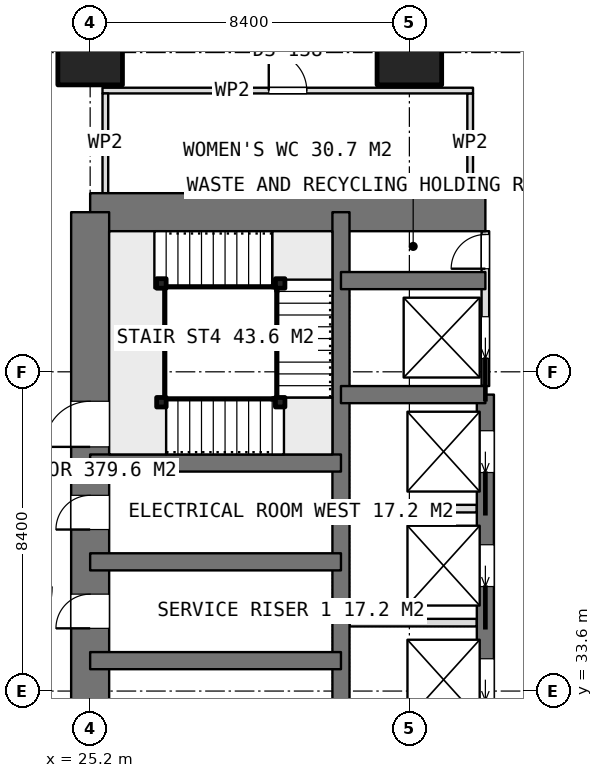
"""IFC4 building model, lengths in metres.
Left out: names, types, materials, properties, quantities, classifications, styles, units other than length and angle.
Written with IfcOpenShell. Run it as: python <this file> out.ifc"""

import sys

from ifc_helpers import new_model, si_unit, direction, frame, frame_2d, origin, origin_2d, place, context, subcontext, project, spatial, rectangle, extrude, element, fill, save


model = new_model("IFC4")
c1 = context("Model", 3, precision=1e-05, world=origin(), true_north=direction((0.0, 1.0)))
c2 = subcontext(c1, "Body", "Model", "MODEL_VIEW")
j1 = project(units=[si_unit("LENGTHUNIT", "METRE"), si_unit("PLANEANGLEUNIT", "RADIAN")], contexts=[c1])
p1 = place(None, origin())
s1 = spatial("IfcSite", under=j1, at=p1, CompositionType="ELEMENT")
p2 = place(p1, origin())
s2 = spatial("IfcBuilding", under=s1, at=p2, CompositionType="ELEMENT")
p3 = place(p2, frame((0.0, 0.0, 129.05)))
s3 = spatial("IfcBuildingStorey", under=s2, at=p3, CompositionType="ELEMENT", Elevation=129.05)
p4 = place(p3, frame((25.2, 46.2, 0.0), z_axis=(0.0, 0.0, 1.0), x_axis=(1.0, 0.0, 0.0)))
e1 = element("IfcWall", 1, at=p4, inside=s3, PredefinedType="SHEAR", context=c2, shape_type="SweptSolid", body=[
    extrude(rectangle(XDim=10.4, YDim=1.0, at=frame_2d((5.2, 0.0))), origin(), (0.0, 0.0, 1.0), 3.75),
])
p5 = place(p3, frame((25.2, 21.0, 0.0), z_axis=(0.0, 0.0, 1.0), x_axis=(0.0, 1.0, 0.0)))
e2 = element("IfcWall", 2, at=p5, inside=s3, PredefinedType="SHEAR", context=c2, shape_type="SweptSolid", body=[
    extrude(rectangle(XDim=25.2, YDim=1.0, at=frame_2d((12.6, 0.0))), origin(), (0.0, 0.0, 1.0), 3.75),
])
p6 = place(p5, frame((7.8, 0.0, 0.0)))
e3 = element("IfcOpeningElement", 3, at=p6, cuts=e2, PredefinedType="OPENING", context=c2, shape_type="SweptSolid", body=[
    extrude(rectangle(XDim=1.2, YDim=2.1, at=frame_2d((0.6, 1.05))), frame((0.0, 0.51, 0.0), z_axis=(0.0, -1.0, 0.0), x_axis=(1.0, 0.0, 0.0)), (0.0, 0.0, 1.0), 1.02),
])
p7 = place(p5, frame((14.25, 0.0, 0.0)))
e4 = element("IfcOpeningElement", 4, at=p7, cuts=e2, PredefinedType="OPENING", context=c2, shape_type="SweptSolid", body=[
    extrude(rectangle(XDim=0.9, YDim=2.1, at=frame_2d((0.45, 1.05))), frame((0.0, 0.51, 0.0), z_axis=(0.0, -1.0, 0.0), x_axis=(1.0, 0.0, 0.0)), (0.0, 0.0, 1.0), 1.02),
])
p8 = place(p5, frame((16.85, 0.0, 0.0)))
e5 = element("IfcOpeningElement", 5, at=p8, cuts=e2, PredefinedType="OPENING", context=c2, shape_type="SweptSolid", body=[
    extrude(rectangle(XDim=0.9, YDim=2.1, at=frame_2d((0.45, 1.05))), frame((0.0, 0.51, 0.0), z_axis=(0.0, -1.0, 0.0), x_axis=(1.0, 0.0, 0.0)), (0.0, 0.0, 1.0), 1.02),
])
p9 = place(p5, frame((19.025, 0.0, 0.0)))
e6 = element("IfcOpeningElement", 6, at=p9, cuts=e2, PredefinedType="OPENING", context=c2, shape_type="SweptSolid", body=[
    extrude(rectangle(XDim=1.2, YDim=2.1, at=frame_2d((0.6, 1.05))), frame((0.0, 0.51, 0.0), z_axis=(0.0, -1.0, 0.0), x_axis=(1.0, 0.0, 0.0)), (0.0, 0.0, 1.0), 1.02),
])
p10 = place(p3, frame((31.8, 21.0, 0.0), z_axis=(0.0, 0.0, 1.0), x_axis=(0.0, 1.0, 0.0)))
e7 = element("IfcWall", 7, at=p10, inside=s3, PredefinedType="SHEAR", context=c2, shape_type="SweptSolid", body=[
    extrude(rectangle(XDim=25.2, YDim=0.45, at=frame_2d((12.6, 0.0))), origin(), (0.0, 0.0, 1.0), 3.75),
])
p11 = place(p3, frame((35.6, 23.4, 0.0), z_axis=(0.0, 0.0, 1.0), x_axis=(0.0, 1.0, 0.0)))
e8 = element("IfcWall", 8, at=p11, inside=s3, PredefinedType="SHEAR", context=c2, shape_type="SweptSolid", body=[
    extrude(rectangle(XDim=18.0, YDim=0.45, at=frame_2d((9.0, 0.0))), origin(), (0.0, 0.0, 1.0), 3.75),
])
p12 = place(p11, frame((0.95, 0.0, 0.0)))
e9 = element("IfcOpeningElement", 9, at=p12, cuts=e8, PredefinedType="OPENING", context=c2, shape_type="SweptSolid", body=[
    extrude(rectangle(XDim=1.1, YDim=2.1, at=frame_2d((0.55, 1.05))), frame((0.0, 0.235, 0.0), z_axis=(0.0, -1.0, 0.0), x_axis=(1.0, 0.0, 0.0)), (0.0, 0.0, 1.0), 0.47),
])
p13 = place(p11, frame((3.95, 0.0, 0.0)))
e10 = element("IfcOpeningElement", 10, at=p13, cuts=e8, PredefinedType="OPENING", context=c2, shape_type="SweptSolid", body=[
    extrude(rectangle(XDim=1.1, YDim=2.1, at=frame_2d((0.55, 1.05))), frame((0.0, 0.235, 0.0), z_axis=(0.0, -1.0, 0.0), x_axis=(1.0, 0.0, 0.0)), (0.0, 0.0, 1.0), 0.47),
])
p14 = place(p11, frame((6.95, 0.0, 0.0)))
e11 = element("IfcOpeningElement", 11, at=p14, cuts=e8, PredefinedType="OPENING", context=c2, shape_type="SweptSolid", body=[
    extrude(rectangle(XDim=1.1, YDim=2.1, at=frame_2d((0.55, 1.05))), frame((0.0, 0.235, 0.0), z_axis=(0.0, -1.0, 0.0), x_axis=(1.0, 0.0, 0.0)), (0.0, 0.0, 1.0), 0.47),
])
p15 = place(p11, frame((9.95, 0.0, 0.0)))
e12 = element("IfcOpeningElement", 12, at=p15, cuts=e8, PredefinedType="OPENING", context=c2, shape_type="SweptSolid", body=[
    extrude(rectangle(XDim=1.1, YDim=2.1, at=frame_2d((0.55, 1.05))), frame((0.0, 0.235, 0.0), z_axis=(0.0, -1.0, 0.0), x_axis=(1.0, 0.0, 0.0)), (0.0, 0.0, 1.0), 0.47),
])
p16 = place(p11, frame((12.95, 0.0, 0.0)))
e13 = element("IfcOpeningElement", 13, at=p16, cuts=e8, PredefinedType="OPENING", context=c2, shape_type="SweptSolid", body=[
    extrude(rectangle(XDim=1.1, YDim=2.1, at=frame_2d((0.55, 1.05))), frame((0.0, 0.235, 0.0), z_axis=(0.0, -1.0, 0.0), x_axis=(1.0, 0.0, 0.0)), (0.0, 0.0, 1.0), 0.47),
])
p17 = place(p11, frame((15.95, 0.0, 0.0)))
e14 = element("IfcOpeningElement", 14, at=p17, cuts=e8, PredefinedType="OPENING", context=c2, shape_type="SweptSolid", body=[
    extrude(rectangle(XDim=1.1, YDim=2.1, at=frame_2d((0.55, 1.05))), frame((0.0, 0.235, 0.0), z_axis=(0.0, -1.0, 0.0), x_axis=(1.0, 0.0, 0.0)), (0.0, 0.0, 1.0), 0.47),
])
for number, where, z_axis, x_axis in (
    (15, (31.8, 41.4, 0.0), (0.0, 0.0, 1.0), (1.0, 0.0, 0.0)),
    (16, (31.8, 44.4, 0.0), (0.0, 0.0, 1.0), (1.0, 0.0, 0.0)),
):
    element("IfcWall", number, at=place(p3, frame(where, z_axis=z_axis, x_axis=x_axis)), inside=s3, PredefinedType="SHEAR", context=c2, shape_type="SweptSolid", body=[
        extrude(rectangle(XDim=3.8, YDim=0.45, at=frame_2d((1.9, 0.0))), origin(), (0.0, 0.0, 1.0), 3.75),
    ])
for number, where, z_axis, x_axis in (
    (17, (25.2, 34.4, 0.0), (0.0, 0.0, 1.0), (1.0, 0.0, 0.0)),
    (18, (25.2, 37.0, 0.0), (0.0, 0.0, 1.0), (1.0, 0.0, 0.0)),
    (19, (25.2, 39.6, 0.0), (0.0, 0.0, 1.0), (1.0, 0.0, 0.0)),
):
    element("IfcWall", number, at=place(p3, frame(where, z_axis=z_axis, x_axis=x_axis)), inside=s3, PredefinedType="SHEAR", context=c2, shape_type="SweptSolid", body=[
        extrude(rectangle(XDim=6.6, YDim=0.45, at=frame_2d((3.3, 0.0))), origin(), (0.0, 0.0, 1.0), 3.75),
    ])
for number, where, z_axis, x_axis in (
    (20, (25.2, 50.4, 0.0), (0.0, 0.0, 1.0), (1.0, 0.0, 0.0)),
    (21, (33.6, 50.4, 0.0), (0.0, 0.0, 1.0), (1.0, 0.0, 0.0)),
):
    element("IfcColumn", number, at=place(p3, frame(where, z_axis=z_axis, x_axis=x_axis)), inside=s3, PredefinedType="COLUMN", context=c2, shape_type="SweptSolid", body=[
        extrude(rectangle(XDim=1.7, YDim=1.7, at=origin_2d()), origin(), (0.0, 0.0, 1.0), 3.75),
    ])
for number, where, z_axis, x_axis in (
    (22, (32.025, 35.4, 0.0), (0.0, 0.0, 1.0), (1.0, 0.0, 0.0)),
    (23, (32.025, 38.4, 0.0), (0.0, 0.0, 1.0), (1.0, 0.0, 0.0)),
):
    element("IfcWall", number, at=place(p3, frame(where, z_axis=z_axis, x_axis=x_axis)), inside=s3, PredefinedType="PARTITIONING", context=c2, shape_type="SweptSolid", body=[
        extrude(rectangle(XDim=3.35, YDim=0.2, at=frame_2d((1.675, 0.0))), origin(), (0.0, 0.0, 1.0), 3.5),
    ])
p18 = place(p3, frame((35.6, 41.625, 0.0), z_axis=(0.0, 0.0, 1.0), x_axis=(0.0, 1.0, 0.0)))
e24 = element("IfcWall", 24, at=p18, inside=s3, PredefinedType="PARTITIONING", context=c2, shape_type="SweptSolid", body=[
    extrude(rectangle(XDim=4.075, YDim=0.2, at=frame_2d((2.038, 0.0))), origin(), (0.0, 0.0, 1.0), 3.5),
])
p19 = place(p18, frame((3.088, 0.0, 0.0)))
e25 = element("IfcOpeningElement", 25, at=p19, cuts=e24, PredefinedType="OPENING", context=c2, shape_type="SweptSolid", body=[
    extrude(rectangle(XDim=0.9, YDim=2.1, at=frame_2d((0.45, 1.05))), frame((0.0, 0.11, 0.0), z_axis=(0.0, -1.0, 0.0), x_axis=(1.0, 0.0, 0.0)), (0.0, 0.0, 1.0), 0.22),
])
p20 = place(p18, frame((0.725, 0.0, 0.0)))
e26 = element("IfcOpeningElement", 26, at=p20, cuts=e24, PredefinedType="OPENING", context=c2, shape_type="SweptSolid", body=[
    extrude(rectangle(XDim=1.1, YDim=2.1, at=frame_2d((0.55, 1.05))), frame((0.0, 0.11, 0.0), z_axis=(0.0, -1.0, 0.0), x_axis=(1.0, 0.0, 0.0)), (0.0, 0.0, 1.0), 0.22),
])
p21 = place(p3, frame((25.525, 49.4, 0.0), z_axis=(0.0, 0.0, 1.0), x_axis=(1.0, 0.0, 0.0)))
e27 = element("IfcWall", 27, at=p21, inside=s3, PredefinedType="PARTITIONING", context=c2, shape_type="SweptSolid", body=[
    extrude(rectangle(XDim=9.75, YDim=0.15, at=frame_2d((4.875, 0.0))), origin(), (0.0, 0.0, 1.0), 3.5),
])
p22 = place(p21, frame((4.375, 0.0, 0.0)))
e28 = element("IfcOpeningElement", 28, at=p22, cuts=e27, PredefinedType="OPENING", context=c2, shape_type="SweptSolid", body=[
    extrude(rectangle(XDim=1.0, YDim=2.1, at=frame_2d((0.5, 1.05))), frame((0.0, 0.085, 0.0), z_axis=(0.0, -1.0, 0.0), x_axis=(1.0, 0.0, 0.0)), (0.0, 0.0, 1.0), 0.17),
])
for number, where, z_axis, x_axis in (
    (29, (25.6, 46.7, 0.0), (0.0, 0.0, 1.0), (0.0, 1.0, 0.0)),
    (30, (35.2, 46.7, 0.0), (0.0, 0.0, 1.0), (0.0, 1.0, 0.0)),
):
    element("IfcWall", number, at=place(p3, frame(where, z_axis=z_axis, x_axis=x_axis)), inside=s3, PredefinedType="PARTITIONING", context=c2, shape_type="SweptSolid", body=[
        extrude(rectangle(XDim=2.625, YDim=0.15, at=frame_2d((1.312, 0.0))), origin(), (0.0, 0.0, 1.0), 3.5),
    ])
for number, where, z_axis, x_axis in (
    (31, (27.075, 41.2, 0.0), (0.0, 0.0, 1.0), (1.0, 0.0, 0.0)),
    (32, (30.2, 41.2, 0.0), (0.0, 0.0, 1.0), (1.0, 0.0, 0.0)),
    (33, (30.2, 44.325, 0.0), (0.0, 0.0, 1.0), (1.0, 0.0, 0.0)),
    (34, (27.075, 44.325, 0.0), (0.0, 0.0, 1.0), (1.0, 0.0, 0.0)),
):
    element("IfcColumn", number, at=place(p3, frame(where, z_axis=z_axis, x_axis=x_axis)), inside=s3, PredefinedType="COLUMN", context=c2, shape_type="SweptSolid", body=[
        extrude(rectangle(XDim=0.25, YDim=0.25, at=origin_2d()), origin(), (0.0, 0.0, 1.0), 3.75),
    ])
p23 = place(p7, origin())
e35 = element("IfcDoor", 35, at=p23, inside=s3, OperationType="SINGLE_SWING_LEFT", PredefinedType="DOOR", context=c2, shape_type="SweptSolid", body=[
    extrude(rectangle(XDim=0.9, YDim=2.1, at=frame_2d((0.45, 1.05))), frame((0.0, 0.025, 0.0), z_axis=(0.0, -1.0, 0.0), x_axis=(1.0, 0.0, 0.0)), (0.0, 0.0, 1.0), 0.05),
])
fill(e4, e35)
p24 = place(p8, origin())
e36 = element("IfcDoor", 36, at=p24, inside=s3, OperationType="SINGLE_SWING_LEFT", PredefinedType="DOOR", context=c2, shape_type="SweptSolid", body=[
    extrude(rectangle(XDim=0.9, YDim=2.1, at=frame_2d((0.45, 1.05))), frame((0.0, 0.025, 0.0), z_axis=(0.0, -1.0, 0.0), x_axis=(1.0, 0.0, 0.0)), (0.0, 0.0, 1.0), 0.05),
])
fill(e5, e36)
p25 = place(p19, origin())
e37 = element("IfcDoor", 37, at=p25, inside=s3, OperationType="SINGLE_SWING_LEFT", PredefinedType="DOOR", context=c2, shape_type="SweptSolid", body=[
    extrude(rectangle(XDim=0.9, YDim=2.1, at=frame_2d((0.45, 1.05))), frame((0.0, 0.025, 0.0), z_axis=(0.0, -1.0, 0.0), x_axis=(1.0, 0.0, 0.0)), (0.0, 0.0, 1.0), 0.05),
])
fill(e25, e37)
p26 = place(p15, origin())
e38 = element("IfcDoor", 38, at=p26, inside=s3, OperationType="SLIDING_TO_LEFT", PredefinedType="USERDEFINED", context=c2, shape_type="SweptSolid", body=[
    extrude(rectangle(XDim=1.1, YDim=2.1, at=frame_2d((0.55, 1.05))), frame((0.0, 0.025, 0.0), z_axis=(0.0, -1.0, 0.0), x_axis=(1.0, 0.0, 0.0)), (0.0, 0.0, 1.0), 0.05),
])
fill(e12, e38)
p27 = place(p16, origin())
e39 = element("IfcDoor", 39, at=p27, inside=s3, OperationType="SLIDING_TO_LEFT", PredefinedType="USERDEFINED", context=c2, shape_type="SweptSolid", body=[
    extrude(rectangle(XDim=1.1, YDim=2.1, at=frame_2d((0.55, 1.05))), frame((0.0, 0.025, 0.0), z_axis=(0.0, -1.0, 0.0), x_axis=(1.0, 0.0, 0.0)), (0.0, 0.0, 1.0), 0.05),
])
fill(e13, e39)
p28 = place(p17, origin())
e40 = element("IfcDoor", 40, at=p28, inside=s3, OperationType="SLIDING_TO_LEFT", PredefinedType="USERDEFINED", context=c2, shape_type="SweptSolid", body=[
    extrude(rectangle(XDim=1.1, YDim=2.1, at=frame_2d((0.55, 1.05))), frame((0.0, 0.025, 0.0), z_axis=(0.0, -1.0, 0.0), x_axis=(1.0, 0.0, 0.0)), (0.0, 0.0, 1.0), 0.05),
])
fill(e14, e40)
p29 = place(p20, origin())
e41 = element("IfcDoor", 41, at=p29, inside=s3, OperationType="SLIDING_TO_LEFT", PredefinedType="USERDEFINED", context=c2, shape_type="SweptSolid", body=[
    extrude(rectangle(XDim=1.1, YDim=2.1, at=frame_2d((0.55, 1.05))), frame((0.0, 0.025, 0.0), z_axis=(0.0, -1.0, 0.0), x_axis=(1.0, 0.0, 0.0)), (0.0, 0.0, 1.0), 0.05),
])
fill(e26, e41)
p30 = place(p22, origin())
e42 = element("IfcDoor", 42, at=p30, inside=s3, OperationType="SINGLE_SWING_LEFT", PredefinedType="DOOR", context=c2, shape_type="SweptSolid", body=[
    extrude(rectangle(XDim=1.0, YDim=2.1, at=frame_2d((0.5, 1.05))), frame((0.0, 0.025, 0.0), z_axis=(0.0, -1.0, 0.0), x_axis=(1.0, 0.0, 0.0)), (0.0, 0.0, 1.0), 0.05),
])
fill(e28, e42)
p31 = place(p9, origin())
e43 = element("IfcDoor", 43, at=p31, inside=s3, OperationType="SINGLE_SWING_RIGHT", PredefinedType="DOOR", context=c2, shape_type="SweptSolid", body=[
    extrude(rectangle(XDim=1.2, YDim=2.1, at=frame_2d((0.6, 1.05))), frame((0.0, 0.025, 0.0), z_axis=(0.0, -1.0, 0.0), x_axis=(1.0, 0.0, 0.0)), (0.0, 0.0, 1.0), 0.05),
])
fill(e6, e43)
save(model, sys.argv[1])
